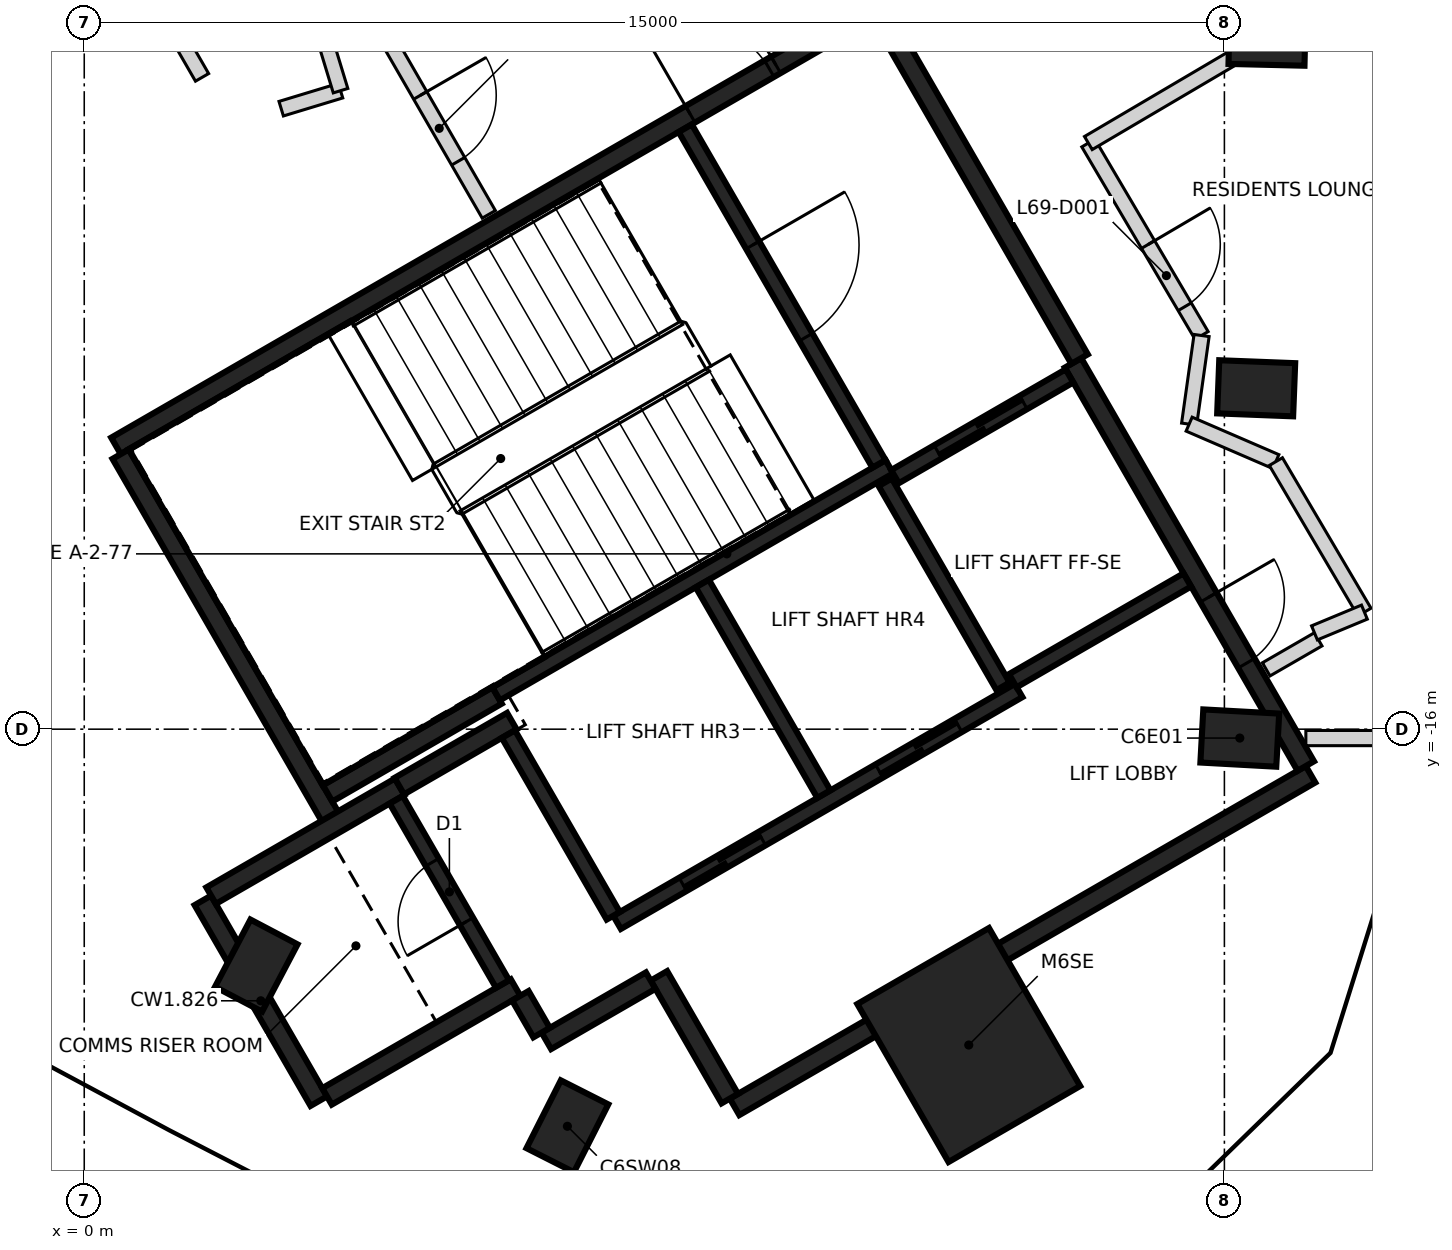
"""IFC4 building model, lengths in metres.
Left out: names, types, materials, properties, quantities, classifications, styles, units other than length and angle.
Written with IfcOpenShell. Run it as: python <this file> out.ifc"""

import sys

from ifc_helpers import new_model, si_unit, direction, frame, frame_2d, origin, origin_2d, place, context, subcontext, project, spatial, rectangle, extrude, element, fill, save


model = new_model("IFC4")
c1 = context("Model", 3, precision=1e-05, world=origin(), true_north=direction((0.0, 1.0)))
c2 = subcontext(c1, "Body", "Model", "MODEL_VIEW")
j1 = project(units=[si_unit("LENGTHUNIT", "METRE"), si_unit("PLANEANGLEUNIT", "RADIAN")], contexts=[c1])
p1 = place(None, origin())
s1 = spatial("IfcSite", under=j1, at=p1, CompositionType="ELEMENT")
p2 = place(p1, origin())
s2 = spatial("IfcBuilding", under=s1, at=p2, CompositionType="ELEMENT")
p3 = place(p2, frame((0.0, 0.0, 273.0)))
s3 = spatial("IfcBuildingStorey", under=s2, at=p3, CompositionType="ELEMENT", Elevation=273.0)
for number, where, z_axis, x_axis in (
    (1, (15.202, -16.117, -0.35), (0.0, 0.0, 1.0), (-0.998, 0.055, 0.0)),
    (2, (15.418, -11.515, -0.35), (0.0, 0.0, 1.0), (-0.999, 0.039, 0.0)),
    (3, (15.562, -6.91, -0.35), (0.0, 0.0, 1.0), (-1.0, 0.024, 0.0)),
    (4, (2.263, -19.11, -0.35), (0.0, 0.0, 1.0), (0.466, 0.885, 0.0)),
    (5, (6.356, -21.224, -0.35), (0.0, 0.0, 1.0), (0.452, 0.892, 0.0)),
):
    element("IfcColumn", number, at=place(p3, frame(where, z_axis=z_axis, x_axis=x_axis)), inside=s3, PredefinedType="COLUMN", context=c2, shape_type="SweptSolid", body=[
        extrude(rectangle(XDim=1.0, YDim=0.7, at=origin_2d()), origin(), (0.0, 0.0, 1.0), 3.6),
    ])
p4 = place(p3, frame((11.637, -20.155, -0.35), z_axis=(0.0, 0.0, 1.0), x_axis=(-0.5, 0.866025403784, 0.0)))
e6 = element("IfcColumn", 6, at=p4, inside=s3, PredefinedType="COLUMN", context=c2, shape_type="SweptSolid", body=[
    extrude(rectangle(XDim=2.4, YDim=2.0, at=origin_2d()), origin(), (0.0, 0.0, 1.0), 3.6),
])
p5 = place(p3, frame((0.417, -12.273, 0.0), z_axis=(0.0, 0.0, 1.0), x_axis=(0.866021906294, 0.500006057782, 0.0)))
e7 = element("IfcWall", 7, at=p5, inside=s3, PredefinedType="SHEAR", context=c2, shape_type="SweptSolid", body=[
    extrude(rectangle(XDim=11.55, YDim=0.25, at=frame_2d((5.775, 0.0))), origin(), (0.0, 0.0, 1.0), 3.25),
])
p6 = place(p5, frame((10.025, 0.0, 0.0)))
e8 = element("IfcOpeningElement", 8, at=p6, cuts=e7, PredefinedType="OPENING", context=c2, shape_type="SweptSolid", body=[
    extrude(rectangle(XDim=1.2, YDim=2.1, at=frame_2d((0.6, 1.05))), frame((0.0, 0.135, 0.0), z_axis=(0.0, -1.0, 0.0), x_axis=(1.0, 0.0, 0.0)), (0.0, 0.0, 1.0), 0.27),
])
p7 = place(p5, frame((8.725, 0.0, 0.0)))
e9 = element("IfcOpeningElement", 9, at=p7, cuts=e7, PredefinedType="OPENING", context=c2, shape_type="SweptSolid", body=[
    extrude(rectangle(XDim=1.2, YDim=2.1, at=frame_2d((0.6, 1.05))), frame((0.0, 0.135, 0.0), z_axis=(0.0, -1.0, 0.0), x_axis=(1.0, 0.0, 0.0)), (0.0, 0.0, 1.0), 0.27),
])
p8 = place(p3, frame((16.133, -16.594, 0.0), z_axis=(0.0, 0.0, 1.0), x_axis=(-0.866022959057, -0.500004234368, 0.0)))
e10 = element("IfcWall", 10, at=p8, inside=s3, PredefinedType="SHEAR", context=c2, shape_type="SweptSolid", body=[
    extrude(rectangle(XDim=8.75, YDim=0.25, at=frame_2d((4.375, 0.0))), origin(), (0.0, 0.0, 1.0), 3.25),
])
p9 = place(p3, frame((13.008, -11.181, 0.0), z_axis=(0.0, 0.0, 1.0), x_axis=(0.500001955336, -0.866024274868, 0.0)))
e11 = element("IfcWall", 11, at=p9, inside=s3, PredefinedType="SHEAR", context=c2, shape_type="SweptSolid", body=[
    extrude(rectangle(XDim=6.125, YDim=0.25, at=frame_2d((3.062, 0.0))), origin(), (0.0, 0.0, 1.0), 3.25),
])
p10 = place(p9, frame((3.563, 0.0, 0.0)))
e12 = element("IfcOpeningElement", 12, at=p10, cuts=e11, PredefinedType="OPENING", context=c2, shape_type="SweptSolid", body=[
    extrude(rectangle(XDim=1.0, YDim=2.1, at=frame_2d((0.5, 1.05))), frame((0.0, 0.135, 0.0), z_axis=(0.0, -1.0, 0.0), x_axis=(1.0, 0.0, 0.0)), (0.0, 0.0, 1.0), 0.27),
])
p11 = place(p3, frame((3.235, -17.153, 0.0), z_axis=(0.0, 0.0, 1.0), x_axis=(-0.500008851346, 0.866020293397, 0.0)))
e13 = element("IfcWall", 13, at=p11, inside=s3, PredefinedType="SHEAR", context=c2, shape_type="SweptSolid", body=[
    extrude(rectangle(XDim=5.51, YDim=0.25, at=frame_2d((2.755, 0.0))), origin(), (0.0, 0.0, 1.0), 3.25),
])
p12 = place(p3, frame((10.483, -6.606, 0.0), z_axis=(0.0, 0.0, 1.0), x_axis=(0.49999885962, -0.866026062182, 0.0)))
e14 = element("IfcWall", 14, at=p12, inside=s3, PredefinedType="SHEAR", context=c2, shape_type="SweptSolid", body=[
    extrude(rectangle(XDim=5.225, YDim=0.25, at=frame_2d((2.612, 0.0))), origin(), (0.0, 0.0, 1.0), 3.25),
])
p13 = place(p3, frame((3.085, -20.894, 0.0), z_axis=(0.0, 0.0, 1.0), x_axis=(-0.499978833458, 0.866037623948, 0.0)))
e15 = element("IfcWall", 15, at=p13, inside=s3, PredefinedType="SHEAR", context=c2, shape_type="SweptSolid", body=[
    extrude(rectangle(XDim=3.05, YDim=0.25, at=frame_2d((1.525, 0.0))), origin(), (0.0, 0.0, 1.0), 3.25),
])
p14 = place(p3, frame((1.669, -18.19, 0.0), z_axis=(0.0, 0.0, 1.0), x_axis=(0.866042235819, 0.499970844928, 0.0)))
e16 = element("IfcWall", 16, at=p14, inside=s3, PredefinedType="SHEAR", context=c2, shape_type="SweptSolid", body=[
    extrude(rectangle(XDim=2.865, YDim=0.25, at=frame_2d((1.432, 0.0))), origin(), (0.0, 0.0, 1.0), 3.25),
])
p15 = place(p3, frame((5.675, -19.399, 0.0), z_axis=(0.0, 0.0, 1.0), x_axis=(-0.866026637627, -0.499997862916, 0.0)))
e17 = element("IfcWall", 17, at=p15, inside=s3, PredefinedType="SHEAR", context=c2, shape_type="SweptSolid", body=[
    extrude(rectangle(XDim=2.865, YDim=0.25, at=frame_2d((1.432, 0.0))), origin(), (0.0, 0.0, 1.0), 3.25),
])
p16 = place(p3, frame((5.431, -15.556, 0.0), z_axis=(0.0, 0.0, 1.0), x_axis=(-0.866022940537, -0.500004266446, 0.0)))
e18 = element("IfcWall", 18, at=p16, inside=s3, PredefinedType="SHEAR", context=c2, shape_type="SweptSolid", body=[
    extrude(rectangle(XDim=2.575, YDim=0.25, at=frame_2d((1.287, 0.0))), origin(), (0.0, 0.0, 1.0), 3.25),
])
p17 = place(p3, frame((8.493, -20.86, 0.0), z_axis=(0.0, 0.0, 1.0), x_axis=(-0.500039802285, 0.866002422705, 0.0)))
e19 = element("IfcWall", 19, at=p17, inside=s3, PredefinedType="SHEAR", context=c2, shape_type="SweptSolid", body=[
    extrude(rectangle(XDim=1.865, YDim=0.25, at=frame_2d((0.932, 0.0))), origin(), (0.0, 0.0, 1.0), 3.25),
])
p18 = place(p3, frame((4.145, -16.749, 0.0), z_axis=(0.0, 0.0, 1.0), x_axis=(0.866038183914, 0.499977863513, 0.0)))
e20 = element("IfcWall", 20, at=p18, inside=s3, PredefinedType="SHEAR", context=c2, shape_type="SweptSolid", body=[
    extrude(rectangle(XDim=1.71, YDim=0.25, at=frame_2d((0.855, 0.0))), origin(), (0.0, 0.0, 1.0), 3.25),
])
p19 = place(p3, frame((7.452, -19.308, 0.0), z_axis=(0.0, 0.0, 1.0), x_axis=(-0.866044474677, -0.49996696679, 0.0)))
e21 = element("IfcWall", 21, at=p19, inside=s3, PredefinedType="SHEAR", context=c2, shape_type="SweptSolid", body=[
    extrude(rectangle(XDim=1.584, YDim=0.25, at=frame_2d((0.792, 0.0))), origin(), (0.0, 0.0, 1.0), 3.25),
])
p20 = place(p3, frame((6.017, -19.992, 0.0), z_axis=(0.0, 0.0, 1.0), x_axis=(-0.500364886717, 0.865814633822, 0.0)))
e22 = element("IfcWall", 22, at=p20, inside=s3, PredefinedType="SHEAR", context=c2, shape_type="SweptSolid", body=[
    extrude(rectangle(XDim=0.559, YDim=0.25, at=frame_2d((0.28, 0.0))), origin(), (0.0, 0.0, 1.0), 3.25),
])
p21 = place(p3, frame((5.419, -15.534, 0.0), z_axis=(0.0, 0.0, 1.0), x_axis=(0.866029065029, 0.499993658486, 0.0)))
e23 = element("IfcWall", 23, at=p21, inside=s3, PredefinedType="SHEAR", context=c2, shape_type="SweptSolid", body=[
    extrude(rectangle(XDim=5.974, YDim=0.2, at=frame_2d((2.987, 0.0))), origin(), (0.0, 0.0, 1.0), 3.25),
])
p22 = place(p3, frame((7.01, -18.542, 0.0), z_axis=(0.0, 0.0, 1.0), x_axis=(0.866030299012, 0.499991521122, 0.0)))
e24 = element("IfcWall", 24, at=p22, inside=s3, PredefinedType="SHEAR", context=c2, shape_type="SweptSolid", body=[
    extrude(rectangle(XDim=6.1, YDim=0.2, at=frame_2d((3.05, 0.0))), origin(), (0.0, 0.0, 1.0), 3.25),
])
p23 = place(p22, frame((1.0, 0.0, 0.0)))
e25 = element("IfcOpeningElement", 25, at=p23, cuts=e24, PredefinedType="OPENING", context=c2, shape_type="SweptSolid", body=[
    extrude(rectangle(XDim=1.2, YDim=2.1, at=frame_2d((0.6, 1.05))), frame((0.0, 0.11, 0.0), z_axis=(0.0, -1.0, 0.0), x_axis=(1.0, 0.0, 0.0)), (0.0, 0.0, 1.0), 0.22),
])
p24 = place(p22, frame((3.982, 0.0, 0.0)))
e26 = element("IfcOpeningElement", 26, at=p24, cuts=e24, PredefinedType="OPENING", context=c2, shape_type="SweptSolid", body=[
    extrude(rectangle(XDim=1.2, YDim=2.1, at=frame_2d((0.6, 1.05))), frame((0.0, 0.11, 0.0), z_axis=(0.0, -1.0, 0.0), x_axis=(1.0, 0.0, 0.0)), (0.0, 0.0, 1.0), 0.22),
])
p25 = place(p3, frame((7.906, -8.094, 0.0), z_axis=(0.0, 0.0, 1.0), x_axis=(0.500027839223, -0.866009330205, 0.0)))
e27 = element("IfcWall", 27, at=p25, inside=s3, PredefinedType="SHEAR", context=c2, shape_type="SweptSolid", body=[
    extrude(rectangle(XDim=5.098, YDim=0.2, at=frame_2d((2.549, 0.0))), origin(), (0.0, 0.0, 1.0), 3.25),
])
p26 = place(p25, frame((1.774, 0.0, 0.0)))
e28 = element("IfcOpeningElement", 28, at=p26, cuts=e27, PredefinedType="OPENING", context=c2, shape_type="SweptSolid", body=[
    extrude(rectangle(XDim=1.4, YDim=2.1, at=frame_2d((0.7, 1.05))), frame((0.0, 0.11, 0.0), z_axis=(0.0, -1.0, 0.0), x_axis=(1.0, 0.0, 0.0)), (0.0, 0.0, 1.0), 0.22),
])
p27 = place(p3, frame((8.132, -14.084, 0.0), z_axis=(0.0, 0.0, 1.0), x_axis=(0.499997778408, -0.866026686418, 0.0)))
e29 = element("IfcWall", 29, at=p27, inside=s3, PredefinedType="SHEAR", context=c2, shape_type="SweptSolid", body=[
    extrude(rectangle(XDim=3.198, YDim=0.2, at=frame_2d((1.599, 0.0))), origin(), (0.0, 0.0, 1.0), 3.25),
])
p28 = place(p3, frame((5.503, -19.352, 0.0), z_axis=(0.0, 0.0, 1.0), x_axis=(-0.499986818241, 0.866033014143, 0.0)))
e30 = element("IfcWall", 30, at=p28, inside=s3, PredefinedType="SHEAR", context=c2, shape_type="SweptSolid", body=[
    extrude(rectangle(XDim=2.798, YDim=0.2, at=frame_2d((1.399, 0.0))), origin(), (0.0, 0.0, 1.0), 3.25),
])
p29 = place(p28, frame((0.949, 0.0, 0.0)))
e31 = element("IfcOpeningElement", 31, at=p29, cuts=e30, PredefinedType="OPENING", context=c2, shape_type="SweptSolid", body=[
    extrude(rectangle(XDim=0.9, YDim=2.1, at=frame_2d((0.45, 1.05))), frame((0.0, 0.11, 0.0), z_axis=(0.0, -1.0, 0.0), x_axis=(1.0, 0.0, 0.0)), (0.0, 0.0, 1.0), 0.22),
])
p30 = place(p3, frame((6.96, -18.455, 0.0), z_axis=(0.0, 0.0, 1.0), x_axis=(-0.499926705758, 0.866067716099, 0.0)))
e32 = element("IfcWall", 32, at=p30, inside=s3, PredefinedType="SHEAR", context=c2, shape_type="SweptSolid", body=[
    extrude(rectangle(XDim=2.759, YDim=0.2, at=frame_2d((1.38, 0.0))), origin(), (0.0, 0.0, 1.0), 3.25),
])
p31 = place(p3, frame((12.088, -15.437, 0.0), z_axis=(0.0, 0.0, 1.0), x_axis=(-0.500026960575, 0.86600983753, 0.0)))
e33 = element("IfcWall", 33, at=p31, inside=s3, PredefinedType="SHEAR", context=c2, shape_type="SweptSolid", body=[
    extrude(rectangle(XDim=3.1, YDim=0.2, at=frame_2d((1.55, 0.0))), origin(), (0.0, 0.0, 1.0), 3.25),
])
p32 = place(p3, frame((10.666, -12.678, 0.0), z_axis=(0.0, 0.0, 1.0), x_axis=(0.866018407898, 0.500012117035, 0.0)))
e34 = element("IfcWall", 34, at=p32, inside=s3, PredefinedType="SHEAR", context=c2, shape_type="SweptSolid", body=[
    extrude(rectangle(XDim=2.651, YDim=0.2, at=frame_2d((1.325, 0.0))), origin(), (0.0, 0.0, 1.0), 3.25),
])
p33 = place(p32, frame((0.652, 0.0, 0.0)))
e35 = element("IfcOpeningElement", 35, at=p33, cuts=e34, PredefinedType="OPENING", context=c2, shape_type="SweptSolid", body=[
    extrude(rectangle(XDim=1.3, YDim=2.1, at=frame_2d((0.65, 1.05))), frame((0.0, 0.11, 0.0), z_axis=(0.0, -1.0, 0.0), x_axis=(1.0, 0.0, 0.0)), (0.0, 0.0, 1.0), 0.22),
])
p34 = place(p3, frame((14.512, -14.037, 0.0), z_axis=(0.0, 0.0, 1.0), x_axis=(-0.866018407898, -0.500012117035, 0.0)))
e36 = element("IfcWall", 36, at=p34, inside=s3, PredefinedType="SHEAR", context=c2, shape_type="SweptSolid", body=[
    extrude(rectangle(XDim=2.651, YDim=0.2, at=frame_2d((1.325, 0.0))), origin(), (0.0, 0.0, 1.0), 3.25),
])
p35 = place(p3, frame((1.148, -6.728, 0.0), z_axis=(0.0, 0.0, 1.0), x_axis=(0.499696187967, -0.866200738704, 0.0)))
e37 = element("IfcWall", 37, at=p35, inside=s3, PredefinedType="PARTITIONING", context=c2, shape_type="SweptSolid", body=[
    extrude(rectangle(XDim=0.805, YDim=0.2, at=frame_2d((0.402, 0.0))), origin(), (0.0, 0.0, 1.0), 3.25),
])
p36 = place(p3, frame((2.591, -7.837, 0.0), z_axis=(0.0, 0.0, 1.0), x_axis=(0.956974070788, 0.290173444409, 0.0)))
e38 = element("IfcWall", 38, at=p36, inside=s3, PredefinedType="PARTITIONING", context=c2, shape_type="SweptSolid", body=[
    extrude(rectangle(XDim=0.816, YDim=0.2, at=frame_2d((0.408, 0.0))), origin(), (0.0, 0.0, 1.0), 3.25),
])
p37 = place(p3, frame((3.11, -6.739, 0.0), z_axis=(0.0, 0.0, 1.0), x_axis=(0.291053676179, -0.95670672496, 0.0)))
e39 = element("IfcWall", 39, at=p37, inside=s3, PredefinedType="PARTITIONING", context=c2, shape_type="SweptSolid", body=[
    extrude(rectangle(XDim=0.9, YDim=0.2, at=frame_2d((0.45, 0.0))), origin(), (0.0, 0.0, 1.0), 3.25),
])
p38 = place(p3, frame((3.987, -6.911, 0.0), z_axis=(0.0, 0.0, 1.0), x_axis=(0.499458942258, -0.866337558345, 0.0)))
e40 = element("IfcWall", 40, at=p38, inside=s3, PredefinedType="PARTITIONING", context=c2, shape_type="SweptSolid", body=[
    extrude(rectangle(XDim=2.674, YDim=0.2, at=frame_2d((1.337, 0.0))), origin(), (0.0, 0.0, 1.0), 3.25),
])
p39 = place(p38, frame((0.867, 0.0, 0.0)))
e41 = element("IfcOpeningElement", 41, at=p39, cuts=e40, PredefinedType="OPENING", context=c2, shape_type="SweptSolid", body=[
    extrude(rectangle(XDim=1.0, YDim=2.1, at=frame_2d((0.5, 1.05))), frame((0.0, 0.11, 0.0), z_axis=(0.0, -1.0, 0.0), x_axis=(1.0, 0.0, 0.0)), (0.0, 0.0, 1.0), 0.22),
])
p40 = place(p3, frame((13.21, -8.289, 0.0), z_axis=(0.0, 0.0, 1.0), x_axis=(0.507314348132, -0.861761076041, 0.0)))
e42 = element("IfcWall", 42, at=p40, inside=s3, PredefinedType="PARTITIONING", context=c2, shape_type="SweptSolid", body=[
    extrude(rectangle(XDim=2.937, YDim=0.2, at=frame_2d((1.469, 0.0))), origin(), (0.0, 0.0, 1.0), 3.25),
])
p41 = place(p40, frame((1.549, 0.0, 0.0)))
e43 = element("IfcOpeningElement", 43, at=p41, cuts=e42, PredefinedType="OPENING", context=c2, shape_type="SweptSolid", body=[
    extrude(rectangle(XDim=0.95, YDim=2.1, at=frame_2d((0.475, 1.05))), frame((0.0, 0.11, 0.0), z_axis=(0.0, -1.0, 0.0), x_axis=(1.0, 0.0, 0.0)), (0.0, 0.0, 1.0), 0.22),
])
p42 = place(p3, frame((13.21, -8.289, 0.0), z_axis=(0.0, 0.0, 1.0), x_axis=(0.861654599216, 0.507495174017, 0.0)))
e44 = element("IfcWall", 44, at=p42, inside=s3, PredefinedType="PARTITIONING", context=c2, shape_type="SweptSolid", body=[
    extrude(rectangle(XDim=2.38, YDim=0.2, at=frame_2d((1.19, 0.0))), origin(), (0.0, 0.0, 1.0), 3.25),
])
p43 = place(p3, frame((14.536, -11.987, 0.0), z_axis=(0.0, 0.0, 1.0), x_axis=(0.139331074948, 0.990245854096, 0.0)))
e45 = element("IfcWall", 45, at=p43, inside=s3, PredefinedType="PARTITIONING", context=c2, shape_type="SweptSolid", body=[
    extrude(rectangle(XDim=1.177, YDim=0.2, at=frame_2d((0.589, 0.0))), origin(), (0.0, 0.0, 1.0), 3.25),
])
p44 = place(p3, frame((14.536, -11.987, 0.0), z_axis=(0.0, 0.0, 1.0), x_axis=(0.918013607861, -0.396548881958, 0.0)))
e46 = element("IfcWall", 46, at=p44, inside=s3, PredefinedType="PARTITIONING", context=c2, shape_type="SweptSolid", body=[
    extrude(rectangle(XDim=1.243, YDim=0.2, at=frame_2d((0.622, 0.0))), origin(), (0.0, 0.0, 1.0), 2.35),
])
p45 = place(p3, frame((15.55, -15.213, 0.0), z_axis=(0.0, 0.0, 1.0), x_axis=(0.865989998118, 0.500061319399, 0.0)))
e47 = element("IfcWall", 47, at=p45, inside=s3, PredefinedType="PARTITIONING", context=c2, shape_type="SweptSolid", body=[
    extrude(rectangle(XDim=0.79, YDim=0.2, at=frame_2d((0.395, 0.0))), origin(), (0.0, 0.0, 1.0), 3.25),
])
p46 = place(p3, frame((15.677, -12.48, 0.0), z_axis=(0.0, 0.0, 1.0), x_axis=(0.507256975253, -0.861794848591, 0.0)))
e48 = element("IfcWall", 48, at=p46, inside=s3, PredefinedType="PARTITIONING", context=c2, shape_type="SweptSolid", body=[
    extrude(rectangle(XDim=2.297, YDim=0.2, at=frame_2d((1.148, 0.0))), origin(), (0.0, 0.0, 1.0), 3.25),
])
p47 = place(p3, frame((16.185, -14.733, 0.0), z_axis=(0.0, 0.0, 1.0), x_axis=(0.923472400107, 0.38366486188, 0.0)))
e49 = element("IfcWall", 49, at=p47, inside=s3, PredefinedType="PARTITIONING", context=c2, shape_type="SweptSolid", body=[
    extrude(rectangle(XDim=0.711, YDim=0.2, at=frame_2d((0.356, 0.0))), origin(), (0.0, 0.0, 1.0), 3.25),
])
p48 = place(p3, frame((16.072, -16.117, 0.0), z_axis=(0.0, 0.0, 1.0), x_axis=(1.0, 0.0, 0.0)))
e50 = element("IfcWall", 50, at=p48, inside=s3, PredefinedType="PARTITIONING", context=c2, shape_type="SweptSolid", body=[
    extrude(rectangle(XDim=1.578, YDim=0.2, at=frame_2d((0.789, 0.0))), origin(), (0.0, 0.0, 1.0), 3.25),
])
p49 = place(p33, origin())
e51 = element("IfcDoor", 51, at=p49, inside=s3, OperationType="SLIDING_TO_LEFT", PredefinedType="DOOR", context=c2, shape_type="SweptSolid", body=[
    extrude(rectangle(XDim=1.3, YDim=2.1, at=frame_2d((0.65, 1.05))), frame((0.0, 0.025, 0.0), z_axis=(0.0, -1.0, 0.0), x_axis=(1.0, 0.0, 0.0)), (0.0, 0.0, 1.0), 0.05),
])
fill(e35, e51)
p50 = place(p23, origin())
e52 = element("IfcDoor", 52, at=p50, inside=s3, OperationType="DOUBLE_DOOR_SLIDING", PredefinedType="DOOR", context=c2, shape_type="SweptSolid", body=[
    extrude(rectangle(XDim=1.2, YDim=2.1, at=frame_2d((0.6, 1.05))), frame((0.0, 0.025, 0.0), z_axis=(0.0, -1.0, 0.0), x_axis=(1.0, 0.0, 0.0)), (0.0, 0.0, 1.0), 0.05),
])
fill(e25, e52)
p51 = place(p24, origin())
e53 = element("IfcDoor", 53, at=p51, inside=s3, OperationType="DOUBLE_DOOR_SLIDING", PredefinedType="DOOR", context=c2, shape_type="SweptSolid", body=[
    extrude(rectangle(XDim=1.2, YDim=2.1, at=frame_2d((0.6, 1.05))), frame((0.0, 0.025, 0.0), z_axis=(0.0, -1.0, 0.0), x_axis=(1.0, 0.0, 0.0)), (0.0, 0.0, 1.0), 0.05),
])
fill(e26, e53)
p52 = place(p10, origin())
e54 = element("IfcDoor", 54, at=p52, inside=s3, OperationType="SINGLE_SWING_LEFT", PredefinedType="DOOR", context=c2, shape_type="SweptSolid", body=[
    extrude(rectangle(XDim=1.0, YDim=2.1, at=frame_2d((0.5, 1.05))), frame((0.0, 0.025, 0.0), z_axis=(0.0, -1.0, 0.0), x_axis=(1.0, 0.0, 0.0)), (0.0, 0.0, 1.0), 0.05),
])
fill(e12, e54)
p53 = place(p6, origin())
e55 = element("IfcDoor", 55, at=p53, inside=s3, OperationType="SINGLE_SWING_LEFT", PredefinedType="DOOR", context=c2, shape_type="SweptSolid", body=[
    extrude(rectangle(XDim=1.2, YDim=2.1, at=frame_2d((0.6, 1.05))), frame((0.0, 0.025, 0.0), z_axis=(0.0, -1.0, 0.0), x_axis=(1.0, 0.0, 0.0)), (0.0, 0.0, 1.0), 0.05),
])
fill(e8, e55)
p54 = place(p7, origin())
e56 = element("IfcDoor", 56, at=p54, inside=s3, OperationType="SINGLE_SWING_RIGHT", PredefinedType="DOOR", context=c2, shape_type="SweptSolid", body=[
    extrude(rectangle(XDim=1.2, YDim=2.1, at=frame_2d((0.6, 1.05))), frame((0.0, 0.025, 0.0), z_axis=(0.0, -1.0, 0.0), x_axis=(1.0, 0.0, 0.0)), (0.0, 0.0, 1.0), 0.05),
])
fill(e9, e56)
p55 = place(p26, origin())
e57 = element("IfcDoor", 57, at=p55, inside=s3, OperationType="SINGLE_SWING_LEFT", PredefinedType="DOOR", context=c2, shape_type="SweptSolid", body=[
    extrude(rectangle(XDim=1.4, YDim=2.1, at=frame_2d((0.7, 1.05))), frame((0.0, 0.025, 0.0), z_axis=(0.0, -1.0, 0.0), x_axis=(1.0, 0.0, 0.0)), (0.0, 0.0, 1.0), 0.05),
])
fill(e28, e57)
p56 = place(p29, origin())
e58 = element("IfcDoor", 58, at=p56, inside=s3, OperationType="SINGLE_SWING_RIGHT", PredefinedType="DOOR", context=c2, shape_type="SweptSolid", body=[
    extrude(rectangle(XDim=0.9, YDim=2.1, at=frame_2d((0.45, 1.05))), frame((0.0, 0.025, 0.0), z_axis=(0.0, -1.0, 0.0), x_axis=(1.0, 0.0, 0.0)), (0.0, 0.0, 1.0), 0.05),
])
fill(e31, e58)
p57 = place(p41, origin())
e59 = element("IfcDoor", 59, at=p57, inside=s3, OperationType="SINGLE_SWING_LEFT", PredefinedType="DOOR", context=c2, shape_type="SweptSolid", body=[
    extrude(rectangle(XDim=0.95, YDim=2.1, at=frame_2d((0.475, 1.05))), frame((0.0, 0.025, 0.0), z_axis=(0.0, -1.0, 0.0), x_axis=(1.0, 0.0, 0.0)), (0.0, 0.0, 1.0), 0.05),
])
fill(e43, e59)
p58 = place(p39, frame((1.0, 0.0, 0.0), z_axis=(0.0, 0.0, 1.0), x_axis=(-1.0, 0.0, 0.0)))
e60 = element("IfcDoor", 60, at=p58, inside=s3, OperationType="SINGLE_SWING_LEFT", PredefinedType="DOOR", context=c2, shape_type="SweptSolid", body=[
    extrude(rectangle(XDim=1.0, YDim=2.1, at=frame_2d((0.5, 1.05))), frame((0.0, 0.025, 0.0), z_axis=(0.0, -1.0, 0.0), x_axis=(1.0, 0.0, 0.0)), (0.0, 0.0, 1.0), 0.05),
])
fill(e41, e60)
save(model, sys.argv[1])
